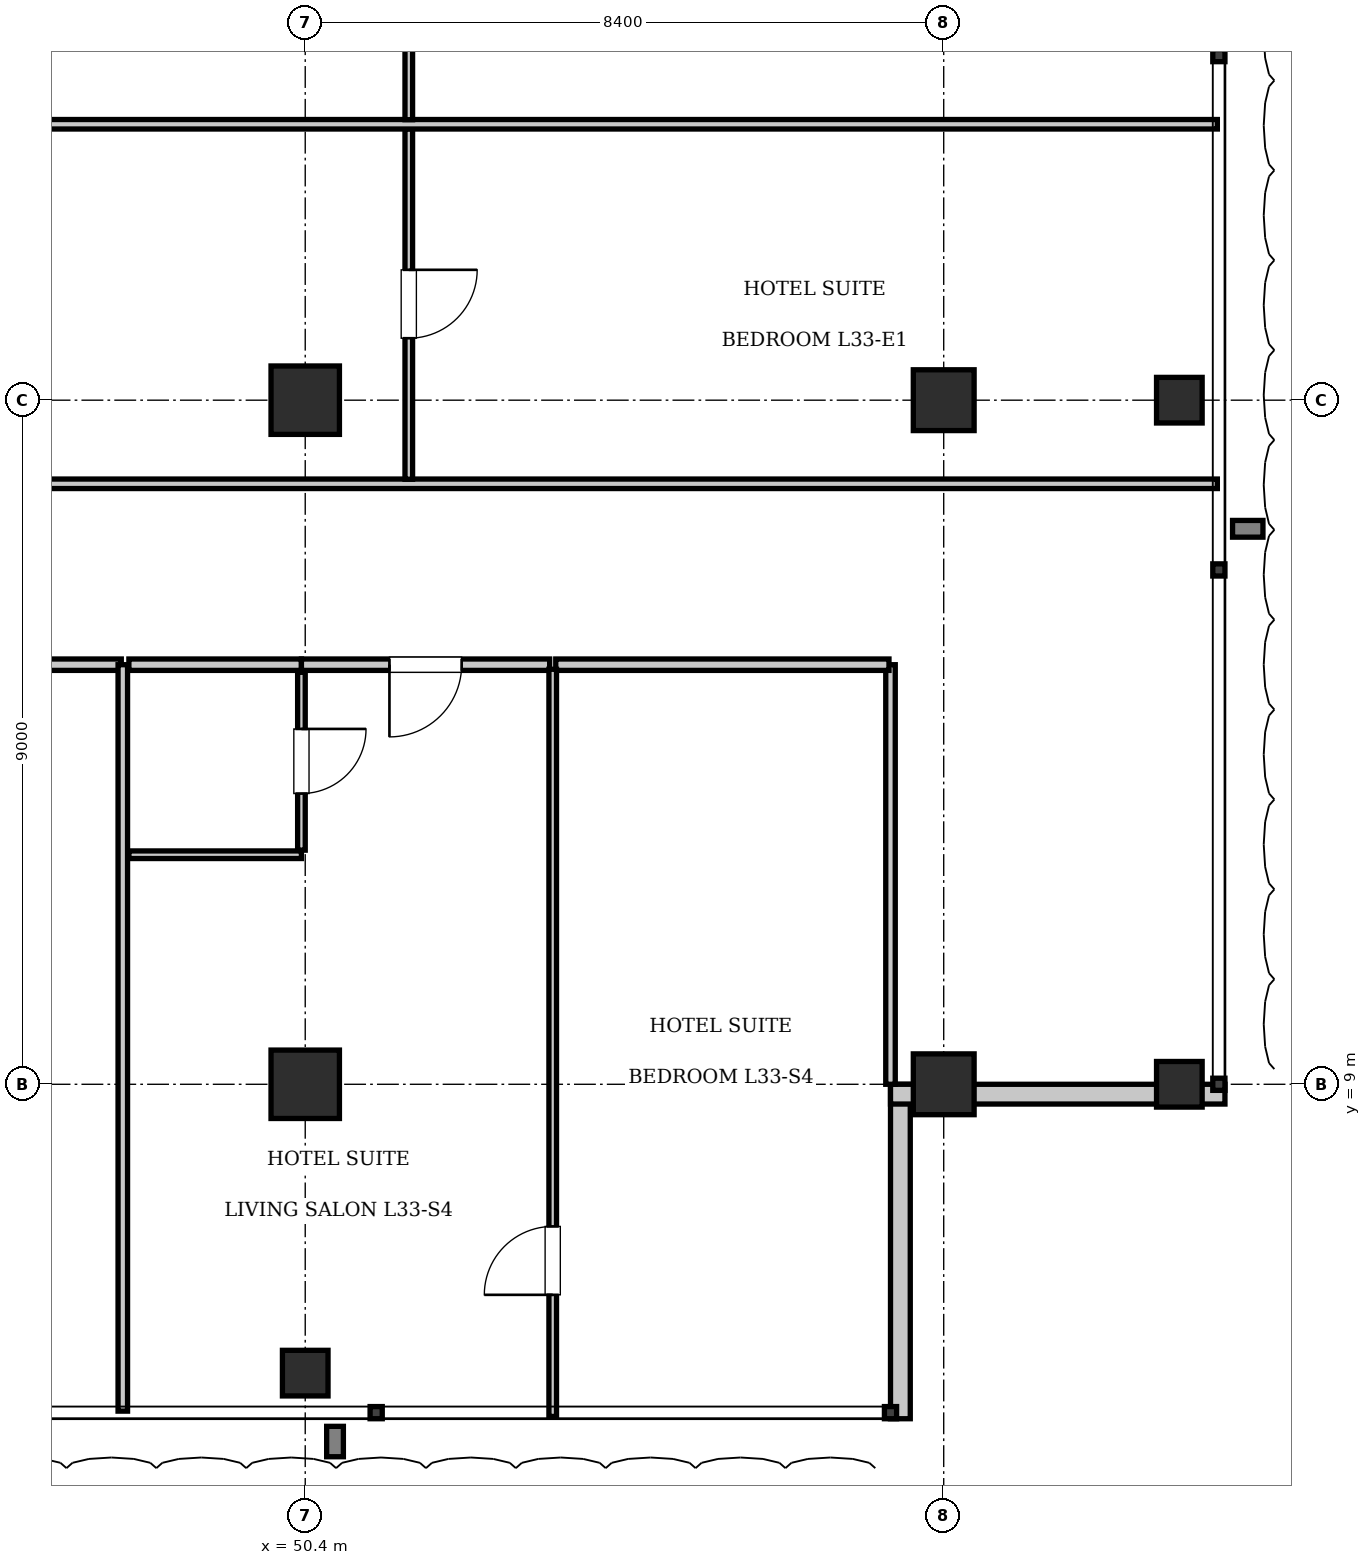
"""IFC4 building model, lengths in metres.
Left out: names, types, materials, properties, quantities, classifications, styles, units other than length and angle.
Written with IfcOpenShell. Run it as: python <this file> out.ifc"""

import sys

from ifc_helpers import new_model, si_unit, direction, frame, frame_2d, origin, origin_2d, place, context, subcontext, project, spatial, rectangle, i_section, extrude, element, fill, save


model = new_model("IFC4")
c1 = context("Model", 3, precision=1e-05, world=origin(), true_north=direction((0.0, 1.0)))
c2 = subcontext(c1, "Body", "Model", "MODEL_VIEW")
j1 = project(units=[si_unit("LENGTHUNIT", "METRE"), si_unit("PLANEANGLEUNIT", "RADIAN")], contexts=[c1])
p1 = place(None, origin())
s1 = spatial("IfcSite", under=j1, at=p1, CompositionType="ELEMENT")
p2 = place(p1, origin())
s2 = spatial("IfcBuilding", under=s1, at=p2, CompositionType="ELEMENT")
p3 = place(p2, frame((0.0, 0.0, 138.95)))
s3 = spatial("IfcBuildingStorey", under=s2, at=p3, CompositionType="ELEMENT", Elevation=138.95)
for number, where, z_axis, x_axis in (
    (1, (50.4, 18.0, 0.0), (0.0, 0.0, 1.0), (1.0, 0.0, 0.0)),
    (2, (50.4, 9.0, 0.0), (0.0, 0.0, 1.0), (1.0, 0.0, 0.0)),
):
    element("IfcColumn", number, at=place(p3, frame(where, z_axis=z_axis, x_axis=x_axis)), inside=s3, PredefinedType="COLUMN", context=c2, shape_type="SweptSolid", body=[
        extrude(rectangle(XDim=0.9, YDim=0.9, at=origin_2d()), origin(), (0.0, 0.0, 1.0), 3.85),
    ])
for number, where, z_axis, x_axis in (
    (3, (58.8, 9.0, 0.0), (0.0, 0.0, 1.0), (1.0, 0.0, 0.0)),
    (4, (58.8, 18.0, 0.0), (0.0, 0.0, 1.0), (1.0, 0.0, 0.0)),
):
    element("IfcColumn", number, at=place(p3, frame(where, z_axis=z_axis, x_axis=x_axis)), inside=s3, PredefinedType="COLUMN", context=c2, shape_type="SweptSolid", body=[
        extrude(rectangle(XDim=0.8, YDim=0.8, at=origin_2d()), origin(), (0.0, 0.0, 1.0), 3.85),
    ])
for number, where, z_axis, x_axis in (
    (5, (61.9, 9.0, 0.0), (0.0, 0.0, 1.0), (1.0, 0.0, 0.0)),
    (6, (61.9, 18.0, 0.0), (0.0, 0.0, 1.0), (1.0, 0.0, 0.0)),
    (7, (50.4, 5.2, 0.0), (0.0, 0.0, 1.0), (1.0, 0.0, 0.0)),
):
    element("IfcColumn", number, at=place(p3, frame(where, z_axis=z_axis, x_axis=x_axis)), inside=s3, PredefinedType="COLUMN", context=c2, shape_type="SweptSolid", body=[
        extrude(i_section(OverallWidth=0.6, OverallDepth=0.6, WebThickness=0.025, FlangeThickness=0.038, at=origin_2d()), origin(), (0.0, 0.0, 1.0), 3.85),
    ])
p4 = place(p3, frame((58.23, 9.0, 0.0), z_axis=(0.0, 0.0, 1.0), x_axis=(0.0, -1.0, 0.0)))
e8 = element("IfcWall", 8, at=p4, inside=s3, PredefinedType="SOLIDWALL", context=c2, shape_type="SweptSolid", body=[
    extrude(rectangle(XDim=4.4, YDim=0.26, at=frame_2d((2.2, 0.0))), origin(), (0.0, 0.0, 1.0), 3.61),
])
p5 = place(p3, frame((62.5, 8.87, 0.0), z_axis=(0.0, 0.0, 1.0), x_axis=(-1.0, 0.0, 0.0)))
e9 = element("IfcWall", 9, at=p5, inside=s3, PredefinedType="SOLIDWALL", context=c2, shape_type="SweptSolid", body=[
    extrude(rectangle(XDim=4.4, YDim=0.26, at=frame_2d((2.2, 0.0))), origin(), (0.0, 0.0, 1.0), 2.998),
])
p6 = place(p3, frame((58.1, 9.0, 0.0), z_axis=(0.0, 0.0, 1.0), x_axis=(0.0, 1.0, 0.0)))
e10 = element("IfcWall", 10, at=p6, inside=s3, PredefinedType="PARTITIONING", context=c2, shape_type="SweptSolid", body=[
    extrude(rectangle(XDim=5.52, YDim=0.125, at=frame_2d((2.76, 0.0))), origin(), (0.0, 0.0, 1.0), 3.61),
])
p7 = place(p3, frame((43.552, 14.52, 0.0), z_axis=(0.0, 0.0, 1.0), x_axis=(1.0, 0.0, 0.0)))
e11 = element("IfcWall", 11, at=p7, inside=s3, PredefinedType="PARTITIONING", context=c2, shape_type="SweptSolid", body=[
    extrude(rectangle(XDim=4.428, YDim=0.15, at=frame_2d((2.214, 0.0))), origin(), (0.0, 0.0, 1.0), 3.61),
])
p8 = place(p3, frame((48.0, 4.7, 0.0), z_axis=(0.0, 0.0, 1.0), x_axis=(0.0, 1.0, 0.0)))
e12 = element("IfcWall", 12, at=p8, inside=s3, PredefinedType="PARTITIONING", context=c2, shape_type="SweptSolid", body=[
    extrude(rectangle(XDim=9.82, YDim=0.125, at=frame_2d((4.91, 0.0))), origin(), (0.0, 0.0, 1.0), 3.61),
])
p9 = place(p3, frame((48.08, 14.52, 0.0), z_axis=(0.0, 0.0, 1.0), x_axis=(1.0, 0.0, 0.0)))
e13 = element("IfcWall", 13, at=p9, inside=s3, PredefinedType="PARTITIONING", context=c2, shape_type="SweptSolid", body=[
    extrude(rectangle(XDim=2.27, YDim=0.15, at=frame_2d((1.135, 0.0))), origin(), (0.0, 0.0, 1.0), 3.61),
])
p10 = place(p3, frame((48.08, 12.02, 0.0), z_axis=(0.0, 0.0, 1.0), x_axis=(1.0, 0.0, 0.0)))
e14 = element("IfcWall", 14, at=p10, inside=s3, PredefinedType="PARTITIONING", context=c2, shape_type="SweptSolid", body=[
    extrude(rectangle(XDim=2.27, YDim=0.1, at=frame_2d((1.135, 0.0))), origin(), (0.0, 0.0, 1.0), 3.61),
])
p11 = place(p3, frame((50.35, 12.08, 0.0), z_axis=(0.0, 0.0, 1.0), x_axis=(0.0, 1.0, 0.0)))
e15 = element("IfcWall", 15, at=p11, inside=s3, PredefinedType="PARTITIONING", context=c2, shape_type="SweptSolid", body=[
    extrude(rectangle(XDim=2.34, YDim=0.1, at=frame_2d((1.17, 0.0))), origin(), (0.0, 0.0, 1.0), 2.998),
])
p12 = place(p11, frame((0.745, 0.0, 0.0)))
e16 = element("IfcOpeningElement", 16, at=p12, cuts=e15, PredefinedType="OPENING", context=c2, shape_type="SweptSolid", body=[
    extrude(rectangle(XDim=0.85, YDim=2.1, at=frame_2d((0.425, 1.05))), frame((0.0, 0.06, 0.0), z_axis=(0.0, -1.0, 0.0), x_axis=(1.0, 0.0, 0.0)), (0.0, 0.0, 1.0), 0.12),
])
p13 = place(p3, frame((50.35, 14.52, 0.0), z_axis=(0.0, 0.0, 1.0), x_axis=(1.0, 0.0, 0.0)))
e17 = element("IfcWall", 17, at=p13, inside=s3, PredefinedType="PARTITIONING", context=c2, shape_type="SweptSolid", body=[
    extrude(rectangle(XDim=3.266, YDim=0.15, at=frame_2d((1.633, 0.0))), origin(), (0.0, 0.0, 1.0), 3.61),
])
p14 = place(p13, frame((1.158, 0.0, 0.0)))
e18 = element("IfcOpeningElement", 18, at=p14, cuts=e17, PredefinedType="OPENING", context=c2, shape_type="SweptSolid", body=[
    extrude(rectangle(XDim=0.95, YDim=2.15, at=frame_2d((0.475, 1.075))), frame((0.0, 0.085, 0.0), z_axis=(0.0, -1.0, 0.0), x_axis=(1.0, 0.0, 0.0)), (0.0, 0.0, 1.0), 0.17),
])
p15 = place(p3, frame((53.696, 14.52, 0.0), z_axis=(0.0, 0.0, 1.0), x_axis=(1.0, 0.0, 0.0)))
e19 = element("IfcWall", 19, at=p15, inside=s3, PredefinedType="PARTITIONING", context=c2, shape_type="SweptSolid", body=[
    extrude(rectangle(XDim=4.384, YDim=0.15, at=frame_2d((2.192, 0.0))), origin(), (0.0, 0.0, 1.0), 3.61),
])
p16 = place(p3, frame((53.656, 4.63, 0.0), z_axis=(0.0, 0.0, 1.0), x_axis=(0.0, 1.0, 0.0)))
e20 = element("IfcWall", 20, at=p16, inside=s3, PredefinedType="PARTITIONING", context=c2, shape_type="SweptSolid", body=[
    extrude(rectangle(XDim=9.83, YDim=0.1, at=frame_2d((4.915, 0.0))), origin(), (0.0, 0.0, 1.0), 3.61),
])
p17 = place(p16, frame((1.6, 0.0, 0.0)))
e21 = element("IfcOpeningElement", 21, at=p17, cuts=e20, PredefinedType="OPENING", context=c2, shape_type="SweptSolid", body=[
    extrude(rectangle(XDim=0.9, YDim=2.1, at=frame_2d((0.45, 1.05))), frame((0.0, 0.06, 0.0), z_axis=(0.0, -1.0, 0.0), x_axis=(1.0, 0.0, 0.0)), (0.0, 0.0, 1.0), 0.12),
])
p18 = place(p3, frame((37.68, 16.9, 0.0), z_axis=(0.0, 0.0, 1.0), x_axis=(1.0, 0.0, 0.0)))
e22 = element("IfcWall", 22, at=p18, inside=s3, PredefinedType="PARTITIONING", context=c2, shape_type="SweptSolid", body=[
    extrude(rectangle(XDim=24.72, YDim=0.125, at=frame_2d((12.36, 0.0))), origin(), (0.0, 0.0, 1.0), 3.61),
])
p19 = place(p3, frame((51.762, 16.96, 0.0), z_axis=(0.0, 0.0, 1.0), x_axis=(0.0, 1.0, 0.0)))
e23 = element("IfcWall", 23, at=p19, inside=s3, PredefinedType="PARTITIONING", context=c2, shape_type="SweptSolid", body=[
    extrude(rectangle(XDim=4.61, YDim=0.1, at=frame_2d((2.305, 0.0))), origin(), (0.0, 0.0, 1.0), 3.61),
])
p20 = place(p19, frame((1.855, 0.0, 0.0)))
e24 = element("IfcOpeningElement", 24, at=p20, cuts=e23, PredefinedType="OPENING", context=c2, shape_type="SweptSolid", body=[
    extrude(rectangle(XDim=0.9, YDim=2.1, at=frame_2d((0.45, 1.05))), frame((0.0, 0.06, 0.0), z_axis=(0.0, -1.0, 0.0), x_axis=(1.0, 0.0, 0.0)), (0.0, 0.0, 1.0), 0.12),
])
p21 = place(p3, frame((37.68, 21.63, 0.0), z_axis=(0.0, 0.0, 1.0), x_axis=(1.0, 0.0, 0.0)))
e25 = element("IfcWall", 25, at=p21, inside=s3, PredefinedType="PARTITIONING", context=c2, shape_type="SweptSolid", body=[
    extrude(rectangle(XDim=24.72, YDim=0.125, at=frame_2d((12.36, 0.0))), origin(), (0.0, 0.0, 1.0), 3.61),
])
p22 = place(p3, frame((51.762, 21.69, 0.0), z_axis=(0.0, 0.0, 1.0), x_axis=(0.0, 1.0, 0.0)))
e26 = element("IfcWall", 26, at=p22, inside=s3, PredefinedType="PARTITIONING", context=c2, shape_type="SweptSolid", body=[
    extrude(rectangle(XDim=4.62, YDim=0.1, at=frame_2d((2.31, 0.0))), origin(), (0.0, 0.0, 1.0), 3.61),
])
p23 = place(p22, frame((1.86, 0.0, 0.0)))
e27 = element("IfcOpeningElement", 27, at=p23, cuts=e26, PredefinedType="OPENING", context=c2, shape_type="SweptSolid", body=[
    extrude(rectangle(XDim=0.9, YDim=2.1, at=frame_2d((0.45, 1.05))), frame((0.0, 0.06, 0.0), z_axis=(0.0, -1.0, 0.0), x_axis=(1.0, 0.0, 0.0)), (0.0, 0.0, 1.0), 0.12),
])
p24 = place(p12, frame((0.85, 0.0, 0.0), z_axis=(0.0, 0.0, 1.0), x_axis=(-1.0, 0.0, 0.0)))
e28 = element("IfcDoor", 28, at=p24, inside=s3, OperationType="SINGLE_SWING_LEFT", PredefinedType="DOOR", context=c2, shape_type="SweptSolid", body=[
    extrude(rectangle(XDim=0.85, YDim=2.1, at=frame_2d((0.425, 1.05))), frame((0.0, 0.025, 0.0), z_axis=(0.0, -1.0, 0.0), x_axis=(1.0, 0.0, 0.0)), (0.0, 0.0, 1.0), 0.05),
])
fill(e16, e28)
p25 = place(p14, frame((0.95, 0.0, 0.0), z_axis=(0.0, 0.0, 1.0), x_axis=(-1.0, 0.0, 0.0)))
e29 = element("IfcDoor", 29, at=p25, inside=s3, OperationType="SINGLE_SWING_RIGHT", PredefinedType="DOOR", context=c2, shape_type="SweptSolid", body=[
    extrude(rectangle(XDim=0.95, YDim=2.15, at=frame_2d((0.475, 1.075))), frame((0.0, 0.025, 0.0), z_axis=(0.0, -1.0, 0.0), x_axis=(1.0, 0.0, 0.0)), (0.0, 0.0, 1.0), 0.05),
])
fill(e18, e29)
p26 = place(p17, origin())
e30 = element("IfcDoor", 30, at=p26, inside=s3, OperationType="SINGLE_SWING_LEFT", PredefinedType="DOOR", context=c2, shape_type="SweptSolid", body=[
    extrude(rectangle(XDim=0.9, YDim=2.1, at=frame_2d((0.45, 1.05))), frame((0.0, 0.025, 0.0), z_axis=(0.0, -1.0, 0.0), x_axis=(1.0, 0.0, 0.0)), (0.0, 0.0, 1.0), 0.05),
])
fill(e21, e30)
p27 = place(p20, frame((0.9, 0.0, 0.0), z_axis=(0.0, 0.0, 1.0), x_axis=(-1.0, 0.0, 0.0)))
e31 = element("IfcDoor", 31, at=p27, inside=s3, OperationType="SINGLE_SWING_LEFT", PredefinedType="DOOR", context=c2, shape_type="SweptSolid", body=[
    extrude(rectangle(XDim=0.9, YDim=2.1, at=frame_2d((0.45, 1.05))), frame((0.0, 0.025, 0.0), z_axis=(0.0, -1.0, 0.0), x_axis=(1.0, 0.0, 0.0)), (0.0, 0.0, 1.0), 0.05),
])
fill(e24, e31)
save(model, sys.argv[1])
